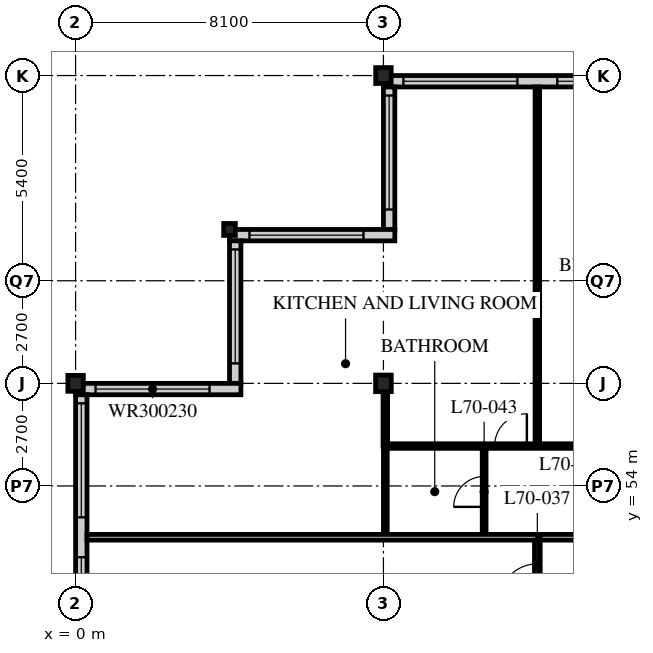
"""IFC4 building model, lengths in metres.
Left out: names, types, materials, properties, quantities, classifications, styles, units other than length and angle.
Written with IfcOpenShell. Run it as: python <this file> out.ifc"""

import sys

from ifc_helpers import new_model, si_unit, direction, frame, frame_2d, origin, origin_2d, place, context, subcontext, project, spatial, rectangle, i_section, extrude, element, fill, save


model = new_model("IFC4")
c1 = context("Model", 3, precision=1e-05, world=origin(), true_north=direction((0.0, 1.0)))
c2 = subcontext(c1, "Body", "Model", "MODEL_VIEW")
j1 = project(units=[si_unit("LENGTHUNIT", "METRE"), si_unit("PLANEANGLEUNIT", "RADIAN")], contexts=[c1])
p1 = place(None, origin())
s1 = spatial("IfcSite", under=j1, at=p1, CompositionType="ELEMENT")
p2 = place(p1, origin())
s2 = spatial("IfcBuilding", under=s1, at=p2, CompositionType="ELEMENT")
p3 = place(p2, frame((0.0, 0.0, 273.6)))
s3 = spatial("IfcBuildingStorey", under=s2, at=p3, CompositionType="ELEMENT", Elevation=273.6)
p4 = place(p3, frame((0.0, 56.7, 0.0), z_axis=(0.0, 0.0, 1.0), x_axis=(1.0, 0.0, 0.0)))
e1 = element("IfcColumn", 1, at=p4, inside=s3, PredefinedType="COLUMN", context=c2, shape_type="SweptSolid", body=[
    extrude(i_section(OverallWidth=0.407, OverallDepth=0.419, WebThickness=0.031, FlangeThickness=0.049, FilletRadius=0.015, at=origin_2d()), origin(), (0.0, 0.0, 1.0), 3.9),
])
p5 = place(p3, frame((4.05, 60.75, 0.0), z_axis=(0.0, 0.0, 1.0), x_axis=(1.0, 0.0, 0.0)))
e2 = element("IfcColumn", 2, at=p5, inside=s3, PredefinedType="COLUMN", context=c2, shape_type="SweptSolid", body=[
    extrude(i_section(OverallWidth=0.307, OverallDepth=0.314, WebThickness=0.012, FlangeThickness=0.019, FilletRadius=0.015, at=origin_2d()), origin(), (0.0, 0.0, 1.0), 3.9),
])
p6 = place(p3, frame((8.1, 56.7, 0.0), z_axis=(0.0, 0.0, 1.0), x_axis=(1.0, 0.0, 0.0)))
e3 = element("IfcColumn", 3, at=p6, inside=s3, PredefinedType="COLUMN", context=c2, shape_type="SweptSolid", body=[
    extrude(i_section(OverallWidth=0.412, OverallDepth=0.437, WebThickness=0.036, FlangeThickness=0.058, FilletRadius=0.015, at=origin_2d()), origin(), (0.0, 0.0, 1.0), 3.9),
])
p7 = place(p3, frame((8.1, 64.8, 0.0), z_axis=(0.0, 0.0, 1.0), x_axis=(1.0, 0.0, 0.0)))
e4 = element("IfcColumn", 4, at=p7, inside=s3, PredefinedType="COLUMN", context=c2, shape_type="SweptSolid", body=[
    extrude(i_section(OverallWidth=0.407, OverallDepth=0.419, WebThickness=0.031, FlangeThickness=0.049, FilletRadius=0.015, at=origin_2d()), origin(), (0.0, 0.0, 1.0), 3.9),
])
p8 = place(p3, frame((48.3, 64.65, 0.0), z_axis=(0.0, 0.0, 1.0), x_axis=(-1.0, 0.0, 0.0)))
e5 = element("IfcWall", 5, at=p8, inside=s3, PredefinedType="SOLIDWALL", context=c2, shape_type="SweptSolid", body=[
    extrude(rectangle(XDim=40.2, YDim=0.3, at=frame_2d((20.1, 0.0))), origin(), (0.0, 0.0, 1.0), 3.69),
])
p9 = place(p8, frame((0.225, 0.0, 0.6)))
e6 = element("IfcOpeningElement", 6, at=p9, cuts=e5, PredefinedType="OPENING", context=c2, shape_type="SweptSolid", body=[
    extrude(rectangle(XDim=3.0, YDim=2.4, at=frame_2d((1.5, 1.2))), frame((0.0, 0.16, 0.0), z_axis=(0.0, -1.0, 0.0), x_axis=(1.0, 0.0, 0.0)), (0.0, 0.0, 1.0), 0.32),
])
p10 = place(p8, frame((4.275, 0.0, 0.6)))
e7 = element("IfcOpeningElement", 7, at=p10, cuts=e5, PredefinedType="OPENING", context=c2, shape_type="SweptSolid", body=[
    extrude(rectangle(XDim=3.0, YDim=2.4, at=frame_2d((1.5, 1.2))), frame((0.0, 0.16, 0.0), z_axis=(0.0, -1.0, 0.0), x_axis=(1.0, 0.0, 0.0)), (0.0, 0.0, 1.0), 0.32),
])
p11 = place(p8, frame((8.325, 0.0, 0.6)))
e8 = element("IfcOpeningElement", 8, at=p11, cuts=e5, PredefinedType="OPENING", context=c2, shape_type="SweptSolid", body=[
    extrude(rectangle(XDim=3.0, YDim=2.4, at=frame_2d((1.5, 1.2))), frame((0.0, 0.16, 0.0), z_axis=(0.0, -1.0, 0.0), x_axis=(1.0, 0.0, 0.0)), (0.0, 0.0, 1.0), 0.32),
])
p12 = place(p8, frame((12.375, 0.0, 0.6)))
e9 = element("IfcOpeningElement", 9, at=p12, cuts=e5, PredefinedType="OPENING", context=c2, shape_type="SweptSolid", body=[
    extrude(rectangle(XDim=3.0, YDim=2.4, at=frame_2d((1.5, 1.2))), frame((0.0, 0.16, 0.0), z_axis=(0.0, -1.0, 0.0), x_axis=(1.0, 0.0, 0.0)), (0.0, 0.0, 1.0), 0.32),
])
p13 = place(p8, frame((16.425, 0.0, 0.6)))
e10 = element("IfcOpeningElement", 10, at=p13, cuts=e5, PredefinedType="OPENING", context=c2, shape_type="SweptSolid", body=[
    extrude(rectangle(XDim=3.0, YDim=2.4, at=frame_2d((1.5, 1.2))), frame((0.0, 0.16, 0.0), z_axis=(0.0, -1.0, 0.0), x_axis=(1.0, 0.0, 0.0)), (0.0, 0.0, 1.0), 0.32),
])
p14 = place(p8, frame((20.475, 0.0, 0.6)))
e11 = element("IfcOpeningElement", 11, at=p14, cuts=e5, PredefinedType="OPENING", context=c2, shape_type="SweptSolid", body=[
    extrude(rectangle(XDim=3.0, YDim=2.4, at=frame_2d((1.5, 1.2))), frame((0.0, 0.16, 0.0), z_axis=(0.0, -1.0, 0.0), x_axis=(1.0, 0.0, 0.0)), (0.0, 0.0, 1.0), 0.32),
])
p15 = place(p8, frame((24.525, 0.0, 0.6)))
e12 = element("IfcOpeningElement", 12, at=p15, cuts=e5, PredefinedType="OPENING", context=c2, shape_type="SweptSolid", body=[
    extrude(rectangle(XDim=3.0, YDim=2.4, at=frame_2d((1.5, 1.2))), frame((0.0, 0.16, 0.0), z_axis=(0.0, -1.0, 0.0), x_axis=(1.0, 0.0, 0.0)), (0.0, 0.0, 1.0), 0.32),
])
p16 = place(p8, frame((28.575, 0.0, 0.6)))
e13 = element("IfcOpeningElement", 13, at=p16, cuts=e5, PredefinedType="OPENING", context=c2, shape_type="SweptSolid", body=[
    extrude(rectangle(XDim=3.0, YDim=2.4, at=frame_2d((1.5, 1.2))), frame((0.0, 0.16, 0.0), z_axis=(0.0, -1.0, 0.0), x_axis=(1.0, 0.0, 0.0)), (0.0, 0.0, 1.0), 0.32),
])
p17 = place(p8, frame((32.625, 0.0, 0.6)))
e14 = element("IfcOpeningElement", 14, at=p17, cuts=e5, PredefinedType="OPENING", context=c2, shape_type="SweptSolid", body=[
    extrude(rectangle(XDim=3.0, YDim=2.4, at=frame_2d((1.5, 1.2))), frame((0.0, 0.16, 0.0), z_axis=(0.0, -1.0, 0.0), x_axis=(1.0, 0.0, 0.0)), (0.0, 0.0, 1.0), 0.32),
])
p18 = place(p8, frame((36.675, 0.0, 0.6)))
e15 = element("IfcOpeningElement", 15, at=p18, cuts=e5, PredefinedType="OPENING", context=c2, shape_type="SweptSolid", body=[
    extrude(rectangle(XDim=3.0, YDim=2.4, at=frame_2d((1.5, 1.2))), frame((0.0, 0.16, 0.0), z_axis=(0.0, -1.0, 0.0), x_axis=(1.0, 0.0, 0.0)), (0.0, 0.0, 1.0), 0.32),
])
p19 = place(p3, frame((8.25, 64.5, 0.0), z_axis=(0.0, 0.0, 1.0), x_axis=(0.0, -1.0, 0.0)))
e16 = element("IfcWall", 16, at=p19, inside=s3, PredefinedType="SOLIDWALL", context=c2, shape_type="SweptSolid", body=[
    extrude(rectangle(XDim=3.75, YDim=0.3, at=frame_2d((1.875, 0.0))), origin(), (0.0, 0.0, 1.0), 3.69),
])
p20 = place(p19, frame((0.225, 0.0, 0.6)))
e17 = element("IfcOpeningElement", 17, at=p20, cuts=e16, PredefinedType="OPENING", context=c2, shape_type="SweptSolid", body=[
    extrude(rectangle(XDim=3.0, YDim=2.3, at=frame_2d((1.5, 1.15))), frame((0.0, 0.16, 0.0), z_axis=(0.0, -1.0, 0.0), x_axis=(1.0, 0.0, 0.0)), (0.0, 0.0, 1.0), 0.32),
])
p21 = place(p3, frame((8.4, 60.6, 0.0), z_axis=(0.0, 0.0, 1.0), x_axis=(-1.0, 0.0, 0.0)))
e18 = element("IfcWall", 18, at=p21, inside=s3, PredefinedType="SOLIDWALL", context=c2, shape_type="SweptSolid", body=[
    extrude(rectangle(XDim=4.35, YDim=0.3, at=frame_2d((2.175, 0.0))), origin(), (0.0, 0.0, 1.0), 3.69),
])
p22 = place(p21, frame((0.825, 0.0, 0.6)))
e19 = element("IfcOpeningElement", 19, at=p22, cuts=e18, PredefinedType="OPENING", context=c2, shape_type="SweptSolid", body=[
    extrude(rectangle(XDim=3.0, YDim=2.3, at=frame_2d((1.5, 1.15))), frame((0.0, 0.16, 0.0), z_axis=(0.0, -1.0, 0.0), x_axis=(1.0, 0.0, 0.0)), (0.0, 0.0, 1.0), 0.32),
])
p23 = place(p3, frame((4.2, 60.45, 0.0), z_axis=(0.0, 0.0, 1.0), x_axis=(0.0, -1.0, 0.0)))
e20 = element("IfcWall", 20, at=p23, inside=s3, PredefinedType="SOLIDWALL", context=c2, shape_type="SweptSolid", body=[
    extrude(rectangle(XDim=3.75, YDim=0.3, at=frame_2d((1.875, 0.0))), origin(), (0.0, 0.0, 1.0), 3.69),
])
p24 = place(p23, frame((0.225, 0.0, 0.6)))
e21 = element("IfcOpeningElement", 21, at=p24, cuts=e20, PredefinedType="OPENING", context=c2, shape_type="SweptSolid", body=[
    extrude(rectangle(XDim=3.0, YDim=2.3, at=frame_2d((1.5, 1.15))), frame((0.0, 0.16, 0.0), z_axis=(0.0, -1.0, 0.0), x_axis=(1.0, 0.0, 0.0)), (0.0, 0.0, 1.0), 0.32),
])
p25 = place(p3, frame((4.35, 56.55, 0.0), z_axis=(0.0, 0.0, 1.0), x_axis=(-1.0, 0.0, 0.0)))
e22 = element("IfcWall", 22, at=p25, inside=s3, PredefinedType="SOLIDWALL", context=c2, shape_type="SweptSolid", body=[
    extrude(rectangle(XDim=4.35, YDim=0.3, at=frame_2d((2.175, 0.0))), origin(), (0.0, 0.0, 1.0), 3.69),
])
p26 = place(p25, frame((0.825, 0.0, 0.6)))
e23 = element("IfcOpeningElement", 23, at=p26, cuts=e22, PredefinedType="OPENING", context=c2, shape_type="SweptSolid", body=[
    extrude(rectangle(XDim=3.0, YDim=2.3, at=frame_2d((1.5, 1.15))), frame((0.0, 0.16, 0.0), z_axis=(0.0, -1.0, 0.0), x_axis=(1.0, 0.0, 0.0)), (0.0, 0.0, 1.0), 0.32),
])
p27 = place(p3, frame((0.15, 56.4, 0.0), z_axis=(0.0, 0.0, 1.0), x_axis=(0.0, -1.0, 0.0)))
e24 = element("IfcWall", 24, at=p27, inside=s3, PredefinedType="SOLIDWALL", context=c2, shape_type="SweptSolid", body=[
    extrude(rectangle(XDim=32.1, YDim=0.3, at=frame_2d((16.05, 0.0))), origin(), (0.0, 0.0, 1.0), 3.69),
])
p28 = place(p27, frame((0.225, 0.0, 0.6)))
e25 = element("IfcOpeningElement", 25, at=p28, cuts=e24, PredefinedType="OPENING", context=c2, shape_type="SweptSolid", body=[
    extrude(rectangle(XDim=3.0, YDim=2.4, at=frame_2d((1.5, 1.2))), frame((0.0, 0.16, 0.0), z_axis=(0.0, -1.0, 0.0), x_axis=(1.0, 0.0, 0.0)), (0.0, 0.0, 1.0), 0.32),
])
p29 = place(p27, frame((4.275, 0.0, 0.6)))
e26 = element("IfcOpeningElement", 26, at=p29, cuts=e24, PredefinedType="OPENING", context=c2, shape_type="SweptSolid", body=[
    extrude(rectangle(XDim=3.0, YDim=2.4, at=frame_2d((1.5, 1.2))), frame((0.0, 0.16, 0.0), z_axis=(0.0, -1.0, 0.0), x_axis=(1.0, 0.0, 0.0)), (0.0, 0.0, 1.0), 0.32),
])
p30 = place(p27, frame((8.325, 0.0, 0.6)))
e27 = element("IfcOpeningElement", 27, at=p30, cuts=e24, PredefinedType="OPENING", context=c2, shape_type="SweptSolid", body=[
    extrude(rectangle(XDim=3.0, YDim=2.4, at=frame_2d((1.5, 1.2))), frame((0.0, 0.16, 0.0), z_axis=(0.0, -1.0, 0.0), x_axis=(1.0, 0.0, 0.0)), (0.0, 0.0, 1.0), 0.32),
])
p31 = place(p27, frame((12.375, 0.0, 0.6)))
e28 = element("IfcOpeningElement", 28, at=p31, cuts=e24, PredefinedType="OPENING", context=c2, shape_type="SweptSolid", body=[
    extrude(rectangle(XDim=3.0, YDim=2.4, at=frame_2d((1.5, 1.2))), frame((0.0, 0.16, 0.0), z_axis=(0.0, -1.0, 0.0), x_axis=(1.0, 0.0, 0.0)), (0.0, 0.0, 1.0), 0.32),
])
p32 = place(p27, frame((16.425, 0.0, 0.6)))
e29 = element("IfcOpeningElement", 29, at=p32, cuts=e24, PredefinedType="OPENING", context=c2, shape_type="SweptSolid", body=[
    extrude(rectangle(XDim=3.0, YDim=2.4, at=frame_2d((1.5, 1.2))), frame((0.0, 0.16, 0.0), z_axis=(0.0, -1.0, 0.0), x_axis=(1.0, 0.0, 0.0)), (0.0, 0.0, 1.0), 0.32),
])
p33 = place(p27, frame((20.475, 0.0, 0.6)))
e30 = element("IfcOpeningElement", 30, at=p33, cuts=e24, PredefinedType="OPENING", context=c2, shape_type="SweptSolid", body=[
    extrude(rectangle(XDim=3.0, YDim=2.4, at=frame_2d((1.5, 1.2))), frame((0.0, 0.16, 0.0), z_axis=(0.0, -1.0, 0.0), x_axis=(1.0, 0.0, 0.0)), (0.0, 0.0, 1.0), 0.32),
])
p34 = place(p27, frame((24.525, 0.0, 0.6)))
e31 = element("IfcOpeningElement", 31, at=p34, cuts=e24, PredefinedType="OPENING", context=c2, shape_type="SweptSolid", body=[
    extrude(rectangle(XDim=3.0, YDim=2.4, at=frame_2d((1.5, 1.2))), frame((0.0, 0.16, 0.0), z_axis=(0.0, -1.0, 0.0), x_axis=(1.0, 0.0, 0.0)), (0.0, 0.0, 1.0), 0.32),
])
p35 = place(p27, frame((28.575, 0.0, 0.6)))
e32 = element("IfcOpeningElement", 32, at=p35, cuts=e24, PredefinedType="OPENING", context=c2, shape_type="SweptSolid", body=[
    extrude(rectangle(XDim=3.0, YDim=2.4, at=frame_2d((1.5, 1.2))), frame((0.0, 0.16, 0.0), z_axis=(0.0, -1.0, 0.0), x_axis=(1.0, 0.0, 0.0)), (0.0, 0.0, 1.0), 0.32),
])
p36 = place(p3, frame((12.15, 52.65, 0.0), z_axis=(0.0, 0.0, 1.0), x_axis=(1.0, 0.0, 0.0)))
e33 = element("IfcWall", 33, at=p36, inside=s3, PredefinedType="PARTITIONING", context=c2, shape_type="SweptSolid", body=[
    extrude(rectangle(XDim=24.3, YDim=0.15, at=frame_2d((12.15, 0.0))), origin(), (0.0, 0.0, 1.0), 3.69),
])
p37 = place(p36, frame((6.4, 0.0, 0.0)))
e34 = element("IfcOpeningElement", 34, at=p37, cuts=e33, PredefinedType="OPENING", context=c2, shape_type="SweptSolid", body=[
    extrude(rectangle(XDim=1.0, YDim=2.1, at=frame_2d((0.5, 1.05))), frame((0.0, 0.085, 0.0), z_axis=(0.0, -1.0, 0.0), x_axis=(1.0, 0.0, 0.0)), (0.0, 0.0, 1.0), 0.17),
])
p38 = place(p36, frame((8.5, 0.0, 0.0)))
e35 = element("IfcOpeningElement", 35, at=p38, cuts=e33, PredefinedType="OPENING", context=c2, shape_type="SweptSolid", body=[
    extrude(rectangle(XDim=1.0, YDim=2.1, at=frame_2d((0.5, 1.05))), frame((0.0, 0.085, 0.0), z_axis=(0.0, -1.0, 0.0), x_axis=(1.0, 0.0, 0.0)), (0.0, 0.0, 1.0), 0.17),
])
p39 = place(p36, frame((16.6, 0.0, 0.0)))
e36 = element("IfcOpeningElement", 36, at=p39, cuts=e33, PredefinedType="OPENING", context=c2, shape_type="SweptSolid", body=[
    extrude(rectangle(XDim=1.0, YDim=2.1, at=frame_2d((0.5, 1.05))), frame((0.0, 0.085, 0.0), z_axis=(0.0, -1.0, 0.0), x_axis=(1.0, 0.0, 0.0)), (0.0, 0.0, 1.0), 0.17),
])
p40 = place(p36, frame((1.525, 0.0, 0.0)))
e37 = element("IfcOpeningElement", 37, at=p40, cuts=e33, PredefinedType="OPENING", context=c2, shape_type="SweptSolid", body=[
    extrude(rectangle(XDim=1.0, YDim=2.1, at=frame_2d((0.5, 1.05))), frame((0.0, 0.085, 0.0), z_axis=(0.0, -1.0, 0.0), x_axis=(1.0, 0.0, 0.0)), (0.0, 0.0, 1.0), 0.17),
])
p41 = place(p3, frame((12.15, 22.5, 0.0), z_axis=(0.0, 0.0, 1.0), x_axis=(0.0, 1.0, 0.0)))
e38 = element("IfcWall", 38, at=p41, inside=s3, PredefinedType="PARTITIONING", context=c2, shape_type="SweptSolid", body=[
    extrude(rectangle(XDim=30.15, YDim=0.15, at=frame_2d((15.075, 0.0))), origin(), (0.0, 0.0, 1.0), 3.69),
])
p42 = place(p41, frame((0.4, 0.0, 0.0)))
e39 = element("IfcOpeningElement", 39, at=p42, cuts=e38, PredefinedType="OPENING", context=c2, shape_type="SweptSolid", body=[
    extrude(rectangle(XDim=1.0, YDim=2.1, at=frame_2d((0.5, 1.05))), frame((0.0, 0.085, 0.0), z_axis=(0.0, -1.0, 0.0), x_axis=(1.0, 0.0, 0.0)), (0.0, 0.0, 1.0), 0.17),
])
p43 = place(p41, frame((18.4, 0.0, 0.0)))
e40 = element("IfcOpeningElement", 40, at=p43, cuts=e38, PredefinedType="OPENING", context=c2, shape_type="SweptSolid", body=[
    extrude(rectangle(XDim=1.0, YDim=2.1, at=frame_2d((0.5, 1.05))), frame((0.0, 0.085, 0.0), z_axis=(0.0, -1.0, 0.0), x_axis=(1.0, 0.0, 0.0)), (0.0, 0.0, 1.0), 0.17),
])
p44 = place(p41, frame((28.45, 0.0, 0.0)))
e41 = element("IfcOpeningElement", 41, at=p44, cuts=e38, PredefinedType="OPENING", context=c2, shape_type="SweptSolid", body=[
    extrude(rectangle(XDim=1.0, YDim=2.1, at=frame_2d((0.5, 1.05))), frame((0.0, 0.085, 0.0), z_axis=(0.0, -1.0, 0.0), x_axis=(1.0, 0.0, 0.0)), (0.0, 0.0, 1.0), 0.17),
])
p45 = place(p3, frame((10.75, 52.65, 0.0), z_axis=(0.0, 0.0, 1.0), x_axis=(0.0, 1.0, 0.0)))
e42 = element("IfcWall", 42, at=p45, inside=s3, PredefinedType="PARTITIONING", context=c2, shape_type="SweptSolid", body=[
    extrude(rectangle(XDim=2.4, YDim=0.1, at=frame_2d((1.2, 0.0))), origin(), (0.0, 0.0, 1.0), 3.69),
])
p46 = place(p45, frame((0.8, 0.0, 0.0)))
e43 = element("IfcOpeningElement", 43, at=p46, cuts=e42, PredefinedType="OPENING", context=c2, shape_type="SweptSolid", body=[
    extrude(rectangle(XDim=0.8, YDim=2.1, at=frame_2d((0.4, 1.05))), frame((0.0, 0.06, 0.0), z_axis=(0.0, -1.0, 0.0), x_axis=(1.0, 0.0, 0.0)), (0.0, 0.0, 1.0), 0.12),
])
p47 = place(p3, frame((8.15, 52.65, 0.0), z_axis=(0.0, 0.0, 1.0), x_axis=(0.0, 1.0, 0.0)))
e44 = element("IfcWall", 44, at=p47, inside=s3, PredefinedType="PARTITIONING", context=c2, shape_type="SweptSolid", body=[
    extrude(rectangle(XDim=2.4, YDim=0.1, at=frame_2d((1.2, 0.0))), origin(), (0.0, 0.0, 1.0), 3.078),
])
p48 = place(p3, frame((8.15, 55.05, 0.0), z_axis=(0.0, 0.0, 1.0), x_axis=(1.0, 0.0, 0.0)))
e45 = element("IfcWall", 45, at=p48, inside=s3, PredefinedType="PARTITIONING", context=c2, shape_type="SweptSolid", body=[
    extrude(rectangle(XDim=8.05, YDim=0.12, at=frame_2d((4.025, 0.0))), origin(), (0.0, 0.0, 1.0), 3.69),
])
p49 = place(p48, frame((6.725, 0.0, 0.0)))
e46 = element("IfcOpeningElement", 46, at=p49, cuts=e45, PredefinedType="OPENING", context=c2, shape_type="SweptSolid", body=[
    extrude(rectangle(XDim=0.85, YDim=2.1, at=frame_2d((0.425, 1.05))), frame((0.0, 0.07, 0.0), z_axis=(0.0, -1.0, 0.0), x_axis=(1.0, 0.0, 0.0)), (0.0, 0.0, 1.0), 0.14),
])
p50 = place(p48, frame((2.875, 0.0, 0.0)))
e47 = element("IfcOpeningElement", 47, at=p50, cuts=e45, PredefinedType="OPENING", context=c2, shape_type="SweptSolid", body=[
    extrude(rectangle(XDim=0.85, YDim=2.1, at=frame_2d((0.425, 1.05))), frame((0.0, 0.07, 0.0), z_axis=(0.0, -1.0, 0.0), x_axis=(1.0, 0.0, 0.0)), (0.0, 0.0, 1.0), 0.14),
])
p51 = place(p3, frame((12.15, 55.05, 0.0), z_axis=(0.0, 0.0, 1.0), x_axis=(0.0, 1.0, 0.0)))
e48 = element("IfcWall", 48, at=p51, inside=s3, PredefinedType="PARTITIONING", context=c2, shape_type="SweptSolid", body=[
    extrude(rectangle(XDim=9.45, YDim=0.12, at=frame_2d((4.725, 0.0))), origin(), (0.0, 0.0, 1.0), 3.69),
])
p52 = place(p3, frame((0.3, 52.65, 0.0), z_axis=(0.0, 0.0, 1.0), x_axis=(1.0, 0.0, 0.0)))
e49 = element("IfcWall", 49, at=p52, inside=s3, PredefinedType="PARTITIONING", context=c2, shape_type="SweptSolid", body=[
    extrude(rectangle(XDim=11.85, YDim=0.15, at=frame_2d((5.925, 0.0))), origin(), (0.0, 0.0, 1.0), 3.69),
])
p53 = place(p3, frame((8.15, 55.05, 0.0), z_axis=(0.0, 0.0, 1.0), x_axis=(0.0, 1.0, 0.0)))
e50 = element("IfcWall", 50, at=p53, inside=s3, PredefinedType="PARTITIONING", context=c2, shape_type="SweptSolid", body=[
    extrude(rectangle(XDim=1.447, YDim=0.12, at=frame_2d((0.724, 0.0))), origin(), (0.0, 0.0, 1.0), 3.078),
])
p54 = place(p17, origin())
e51 = element("IfcWindow", 51, at=p54, inside=s3, PartitioningType="SINGLE_PANEL", PredefinedType="WINDOW", context=c2, shape_type="SweptSolid", body=[
    extrude(rectangle(XDim=3.0, YDim=2.4, at=frame_2d((1.5, 1.2))), frame((0.0, 0.03, 0.0), z_axis=(0.0, -1.0, 0.0), x_axis=(1.0, 0.0, 0.0)), (0.0, 0.0, 1.0), 0.06),
])
fill(e14, e51)
p55 = place(p18, origin())
e52 = element("IfcWindow", 52, at=p55, inside=s3, PartitioningType="SINGLE_PANEL", PredefinedType="WINDOW", context=c2, shape_type="SweptSolid", body=[
    extrude(rectangle(XDim=3.0, YDim=2.4, at=frame_2d((1.5, 1.2))), frame((0.0, 0.03, 0.0), z_axis=(0.0, -1.0, 0.0), x_axis=(1.0, 0.0, 0.0)), (0.0, 0.0, 1.0), 0.06),
])
fill(e15, e52)
p56 = place(p20, origin())
e53 = element("IfcWindow", 53, at=p56, inside=s3, PartitioningType="SINGLE_PANEL", PredefinedType="WINDOW", context=c2, shape_type="SweptSolid", body=[
    extrude(rectangle(XDim=3.0, YDim=2.3, at=frame_2d((1.5, 1.15))), frame((0.0, 0.03, 0.0), z_axis=(0.0, -1.0, 0.0), x_axis=(1.0, 0.0, 0.0)), (0.0, 0.0, 1.0), 0.06),
])
fill(e17, e53)
p57 = place(p22, origin())
e54 = element("IfcWindow", 54, at=p57, inside=s3, PartitioningType="SINGLE_PANEL", PredefinedType="WINDOW", context=c2, shape_type="SweptSolid", body=[
    extrude(rectangle(XDim=3.0, YDim=2.3, at=frame_2d((1.5, 1.15))), frame((0.0, 0.03, 0.0), z_axis=(0.0, -1.0, 0.0), x_axis=(1.0, 0.0, 0.0)), (0.0, 0.0, 1.0), 0.06),
])
fill(e19, e54)
p58 = place(p24, origin())
e55 = element("IfcWindow", 55, at=p58, inside=s3, PartitioningType="SINGLE_PANEL", PredefinedType="WINDOW", context=c2, shape_type="SweptSolid", body=[
    extrude(rectangle(XDim=3.0, YDim=2.3, at=frame_2d((1.5, 1.15))), frame((0.0, 0.03, 0.0), z_axis=(0.0, -1.0, 0.0), x_axis=(1.0, 0.0, 0.0)), (0.0, 0.0, 1.0), 0.06),
])
fill(e21, e55)
p59 = place(p26, origin())
e56 = element("IfcWindow", 56, at=p59, inside=s3, PartitioningType="SINGLE_PANEL", PredefinedType="WINDOW", context=c2, shape_type="SweptSolid", body=[
    extrude(rectangle(XDim=3.0, YDim=2.3, at=frame_2d((1.5, 1.15))), frame((0.0, 0.03, 0.0), z_axis=(0.0, -1.0, 0.0), x_axis=(1.0, 0.0, 0.0)), (0.0, 0.0, 1.0), 0.06),
])
fill(e23, e56)
p60 = place(p28, origin())
e57 = element("IfcWindow", 57, at=p60, inside=s3, PartitioningType="SINGLE_PANEL", PredefinedType="WINDOW", context=c2, shape_type="SweptSolid", body=[
    extrude(rectangle(XDim=3.0, YDim=2.4, at=frame_2d((1.5, 1.2))), frame((0.0, 0.03, 0.0), z_axis=(0.0, -1.0, 0.0), x_axis=(1.0, 0.0, 0.0)), (0.0, 0.0, 1.0), 0.06),
])
fill(e25, e57)
p61 = place(p29, origin())
e58 = element("IfcWindow", 58, at=p61, inside=s3, PartitioningType="SINGLE_PANEL", PredefinedType="WINDOW", context=c2, shape_type="SweptSolid", body=[
    extrude(rectangle(XDim=3.0, YDim=2.4, at=frame_2d((1.5, 1.2))), frame((0.0, 0.03, 0.0), z_axis=(0.0, -1.0, 0.0), x_axis=(1.0, 0.0, 0.0)), (0.0, 0.0, 1.0), 0.06),
])
fill(e26, e58)
p62 = place(p44, origin())
e59 = element("IfcDoor", 59, at=p62, inside=s3, OperationType="SINGLE_SWING_LEFT", PredefinedType="DOOR", context=c2, shape_type="SweptSolid", body=[
    extrude(rectangle(XDim=1.0, YDim=2.1, at=frame_2d((0.5, 1.05))), frame((0.0, 0.025, 0.0), z_axis=(0.0, -1.0, 0.0), x_axis=(1.0, 0.0, 0.0)), (0.0, 0.0, 1.0), 0.05),
])
fill(e41, e59)
p63 = place(p46, origin())
e60 = element("IfcDoor", 60, at=p63, inside=s3, OperationType="SINGLE_SWING_LEFT", PredefinedType="DOOR", context=c2, shape_type="SweptSolid", body=[
    extrude(rectangle(XDim=0.8, YDim=2.1, at=frame_2d((0.4, 1.05))), frame((0.0, 0.025, 0.0), z_axis=(0.0, -1.0, 0.0), x_axis=(1.0, 0.0, 0.0)), (0.0, 0.0, 1.0), 0.05),
])
fill(e43, e60)
p64 = place(p50, origin())
e61 = element("IfcDoor", 61, at=p64, inside=s3, OperationType="SINGLE_SWING_RIGHT", PredefinedType="DOOR", context=c2, shape_type="SweptSolid", body=[
    extrude(rectangle(XDim=0.85, YDim=2.1, at=frame_2d((0.425, 1.05))), frame((0.0, 0.025, 0.0), z_axis=(0.0, -1.0, 0.0), x_axis=(1.0, 0.0, 0.0)), (0.0, 0.0, 1.0), 0.05),
])
fill(e47, e61)
save(model, sys.argv[1])
